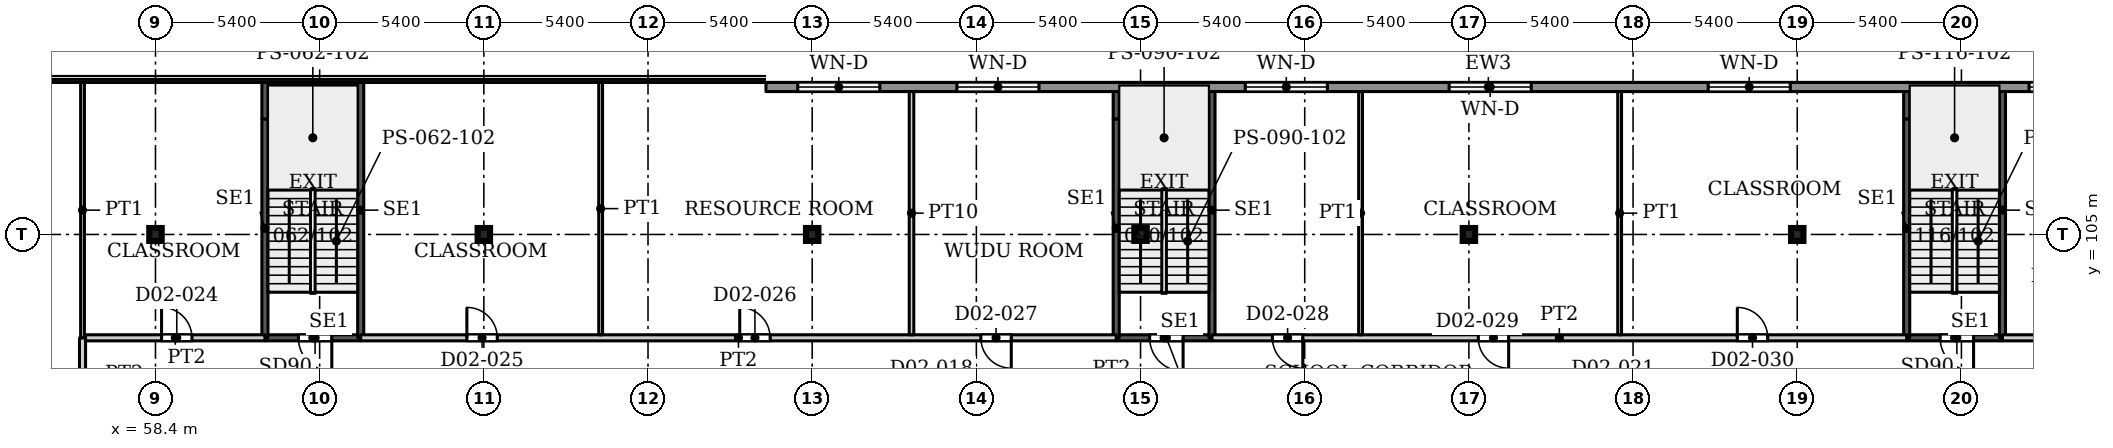
"""IFC4 building model, lengths in metres.
Left out: names, types, materials, properties, quantities, classifications, styles, units other than length and angle.
Written with IfcOpenShell. Run it as: python <this file> out.ifc"""

import sys

from ifc_helpers import new_model, si_unit, direction, frame, frame_2d, origin, origin_2d, place, context, subcontext, project, spatial, rectangle, i_section, extrude, source, transform, mapped, element, fill, save


model = new_model("IFC4")
c1 = context("Model", 3, precision=1e-05, world=origin(), true_north=direction((0.0, 1.0)))
c2 = subcontext(c1, "Body", "Model", "MODEL_VIEW")
j1 = project(units=[si_unit("LENGTHUNIT", "METRE"), si_unit("PLANEANGLEUNIT", "RADIAN")], contexts=[c1])
p1 = place(None, origin())
s1 = spatial("IfcSite", under=j1, at=p1, CompositionType="ELEMENT")
p2 = place(p1, origin())
s2 = spatial("IfcBuilding", under=s1, at=p2, CompositionType="ELEMENT")
p3 = place(p2, frame((0.0, 0.0, 12.5)))
s3 = spatial("IfcBuildingStorey", under=s2, at=p3, CompositionType="ELEMENT", Elevation=12.5)
for number, where, z_axis, x_axis in (
    (1, (58.4, 105.0, 0.0), (0.0, 0.0, 1.0), (1.0, 0.0, 0.0)),
    (2, (69.2, 105.0, 0.0), (0.0, 0.0, 1.0), (1.0, 0.0, 0.0)),
    (3, (80.0, 105.0, 0.0), (0.0, 0.0, 1.0), (1.0, 0.0, 0.0)),
    (4, (90.8, 105.0, 0.0), (0.0, 0.0, 1.0), (1.0, 0.0, 0.0)),
    (5, (101.6, 105.0, 0.0), (0.0, 0.0, 1.0), (1.0, 0.0, 0.0)),
    (6, (112.4, 105.0, 0.0), (0.0, 0.0, 1.0), (1.0, 0.0, 0.0)),
):
    element("IfcColumn", number, at=place(p3, frame(where, z_axis=z_axis, x_axis=x_axis)), inside=s3, PredefinedType="COLUMN", context=c2, shape_type="SweptSolid", body=[
        extrude(i_section(OverallWidth=0.409, OverallDepth=0.425, WebThickness=0.033, FlangeThickness=0.052, FilletRadius=0.013, at=origin_2d()), origin(), (0.0, 0.0, 1.0), 4.5),
    ])
p4 = place(p3, frame((78.48, 109.85, 0.0), z_axis=(0.0, 0.0, 1.0), x_axis=(1.0, 0.0, 0.0)))
e7 = element("IfcWall", 7, at=p4, inside=s3, PredefinedType="SOLIDWALL", context=c2, shape_type="SweptSolid", body=[
    extrude(rectangle(XDim=47.52, YDim=0.3, at=frame_2d((23.76, 0.0))), origin(), (0.0, 0.0, 1.0), 4.25),
])
p5 = place(p4, frame((1.045, 0.0, 0.9)))
e8 = element("IfcOpeningElement", 8, at=p5, cuts=e7, PredefinedType="OPENING", context=c2, shape_type="SweptSolid", body=[
    extrude(rectangle(XDim=2.7, YDim=2.1, at=frame_2d((1.35, 1.05))), frame((0.0, 0.16, 0.0), z_axis=(0.0, -1.0, 0.0), x_axis=(1.0, 0.0, 0.0)), (0.0, 0.0, 1.0), 0.32),
])
p6 = place(p4, frame((6.28, 0.0, 0.9)))
e9 = element("IfcOpeningElement", 9, at=p6, cuts=e7, PredefinedType="OPENING", context=c2, shape_type="SweptSolid", body=[
    extrude(rectangle(XDim=2.7, YDim=2.1, at=frame_2d((1.35, 1.05))), frame((0.0, 0.16, 0.0), z_axis=(0.0, -1.0, 0.0), x_axis=(1.0, 0.0, 0.0)), (0.0, 0.0, 1.0), 0.32),
])
p7 = place(p4, frame((15.765, 0.0, 0.9)))
e10 = element("IfcOpeningElement", 10, at=p7, cuts=e7, PredefinedType="OPENING", context=c2, shape_type="SweptSolid", body=[
    extrude(rectangle(XDim=2.7, YDim=2.1, at=frame_2d((1.35, 1.05))), frame((0.0, 0.16, 0.0), z_axis=(0.0, -1.0, 0.0), x_axis=(1.0, 0.0, 0.0)), (0.0, 0.0, 1.0), 0.32),
])
p8 = place(p4, frame((22.47, 0.0, 0.9)))
e11 = element("IfcOpeningElement", 11, at=p8, cuts=e7, PredefinedType="OPENING", context=c2, shape_type="SweptSolid", body=[
    extrude(rectangle(XDim=2.7, YDim=2.1, at=frame_2d((1.35, 1.05))), frame((0.0, 0.16, 0.0), z_axis=(0.0, -1.0, 0.0), x_axis=(1.0, 0.0, 0.0)), (0.0, 0.0, 1.0), 0.32),
])
p9 = place(p4, frame((30.99, 0.0, 0.9)))
e12 = element("IfcOpeningElement", 12, at=p9, cuts=e7, PredefinedType="OPENING", context=c2, shape_type="SweptSolid", body=[
    extrude(rectangle(XDim=2.7, YDim=2.1, at=frame_2d((1.35, 1.05))), frame((0.0, 0.16, 0.0), z_axis=(0.0, -1.0, 0.0), x_axis=(1.0, 0.0, 0.0)), (0.0, 0.0, 1.0), 0.32),
])
p10 = place(p4, frame((41.545, 0.0, 0.9)))
e13 = element("IfcOpeningElement", 13, at=p10, cuts=e7, PredefinedType="OPENING", context=c2, shape_type="SweptSolid", body=[
    extrude(rectangle(XDim=2.7, YDim=2.1, at=frame_2d((1.35, 1.05))), frame((0.0, 0.16, 0.0), z_axis=(0.0, -1.0, 0.0), x_axis=(1.0, 0.0, 0.0)), (0.0, 0.0, 1.0), 0.32),
])
p11 = place(p3, frame((62.0, 101.6, 0.0), z_axis=(0.0, 0.0, 1.0), x_axis=(1.0, 0.0, 0.0)))
e14 = element("IfcWall", 14, at=p11, inside=s3, PredefinedType="SHEAR", context=c2, shape_type="SweptSolid", body=[
    extrude(rectangle(XDim=3.15, YDim=0.2, at=frame_2d((1.575, 0.0))), origin(), (0.0, 0.0, 1.0), 4.5),
])
p12 = place(p11, frame((1.1, 0.0, 0.0)))
e15 = element("IfcOpeningElement", 15, at=p12, cuts=e14, PredefinedType="OPENING", context=c2, shape_type="SweptSolid", body=[
    extrude(rectangle(XDim=1.1, YDim=2.2, at=frame_2d((0.55, 1.1))), frame((0.0, 0.11, 0.0), z_axis=(0.0, -1.0, 0.0), x_axis=(1.0, 0.0, 0.0)), (0.0, 0.0, 1.0), 0.22),
])
p13 = place(p3, frame((62.0, 101.6, 0.0), z_axis=(0.0, 0.0, 1.0), x_axis=(0.0, 1.0, 0.0)))
e16 = element("IfcWall", 16, at=p13, inside=s3, PredefinedType="SHEAR", context=c2, shape_type="SweptSolid", body=[
    extrude(rectangle(XDim=7.2, YDim=0.2, at=frame_2d((3.6, 0.0))), origin(), (0.0, 0.0, 1.0), 4.5),
])
p14 = place(p3, frame((62.0, 108.8, 0.0), z_axis=(0.0, 0.0, 1.0), x_axis=(0.0, 1.0, 0.0)))
e17 = element("IfcWall", 17, at=p14, inside=s3, PredefinedType="SHEAR", context=c2, shape_type="SweptSolid", body=[
    extrude(rectangle(XDim=1.2, YDim=0.2, at=frame_2d((0.6, 0.0))), origin(), (0.0, 0.0, 1.0), 4.5),
])
p15 = place(p3, frame((65.15, 101.6, 0.0), z_axis=(0.0, 0.0, 1.0), x_axis=(0.0, 1.0, 0.0)))
e18 = element("IfcWall", 18, at=p15, inside=s3, PredefinedType="SHEAR", context=c2, shape_type="SweptSolid", body=[
    extrude(rectangle(XDim=8.4, YDim=0.2, at=frame_2d((4.2, 0.0))), origin(), (0.0, 0.0, 1.0), 4.5),
])
p16 = place(p3, frame((90.0, 101.6, 0.0), z_axis=(0.0, 0.0, 1.0), x_axis=(1.0, 0.0, 0.0)))
e19 = element("IfcWall", 19, at=p16, inside=s3, PredefinedType="SHEAR", context=c2, shape_type="SweptSolid", body=[
    extrude(rectangle(XDim=3.15, YDim=0.2, at=frame_2d((1.575, 0.0))), origin(), (0.0, 0.0, 1.0), 4.5),
])
p17 = place(p16, frame((1.1, 0.0, 0.0)))
e20 = element("IfcOpeningElement", 20, at=p17, cuts=e19, PredefinedType="OPENING", context=c2, shape_type="SweptSolid", body=[
    extrude(rectangle(XDim=1.1, YDim=2.2, at=frame_2d((0.55, 1.1))), frame((0.0, 0.11, 0.0), z_axis=(0.0, -1.0, 0.0), x_axis=(1.0, 0.0, 0.0)), (0.0, 0.0, 1.0), 0.22),
])
p18 = place(p3, frame((90.0, 101.6, 0.0), z_axis=(0.0, 0.0, 1.0), x_axis=(0.0, 1.0, 0.0)))
e21 = element("IfcWall", 21, at=p18, inside=s3, PredefinedType="SHEAR", context=c2, shape_type="SweptSolid", body=[
    extrude(rectangle(XDim=7.2, YDim=0.2, at=frame_2d((3.6, 0.0))), origin(), (0.0, 0.0, 1.0), 4.5),
])
p19 = place(p3, frame((90.0, 108.8, 0.0), z_axis=(0.0, 0.0, 1.0), x_axis=(0.0, 1.0, 0.0)))
e22 = element("IfcWall", 22, at=p19, inside=s3, PredefinedType="SHEAR", context=c2, shape_type="SweptSolid", body=[
    extrude(rectangle(XDim=1.2, YDim=0.2, at=frame_2d((0.6, 0.0))), origin(), (0.0, 0.0, 1.0), 4.5),
])
p20 = place(p3, frame((93.15, 101.6, 0.0), z_axis=(0.0, 0.0, 1.0), x_axis=(0.0, 1.0, 0.0)))
e23 = element("IfcWall", 23, at=p20, inside=s3, PredefinedType="SHEAR", context=c2, shape_type="SweptSolid", body=[
    extrude(rectangle(XDim=8.4, YDim=0.2, at=frame_2d((4.2, 0.0))), origin(), (0.0, 0.0, 1.0), 4.5),
])
p21 = place(p3, frame((116.0, 101.6, 0.0), z_axis=(0.0, 0.0, 1.0), x_axis=(1.0, 0.0, 0.0)))
e24 = element("IfcWall", 24, at=p21, inside=s3, PredefinedType="SHEAR", context=c2, shape_type="SweptSolid", body=[
    extrude(rectangle(XDim=3.15, YDim=0.2, at=frame_2d((1.575, 0.0))), origin(), (0.0, 0.0, 1.0), 4.5),
])
p22 = place(p21, frame((1.1, 0.0, 0.0)))
e25 = element("IfcOpeningElement", 25, at=p22, cuts=e24, PredefinedType="OPENING", context=c2, shape_type="SweptSolid", body=[
    extrude(rectangle(XDim=1.1, YDim=2.2, at=frame_2d((0.55, 1.1))), frame((0.0, 0.11, 0.0), z_axis=(0.0, -1.0, 0.0), x_axis=(1.0, 0.0, 0.0)), (0.0, 0.0, 1.0), 0.22),
])
p23 = place(p3, frame((116.0, 101.6, 0.0), z_axis=(0.0, 0.0, 1.0), x_axis=(0.0, 1.0, 0.0)))
e26 = element("IfcWall", 26, at=p23, inside=s3, PredefinedType="SHEAR", context=c2, shape_type="SweptSolid", body=[
    extrude(rectangle(XDim=7.2, YDim=0.2, at=frame_2d((3.6, 0.0))), origin(), (0.0, 0.0, 1.0), 4.5),
])
p24 = place(p3, frame((116.0, 108.8, 0.0), z_axis=(0.0, 0.0, 1.0), x_axis=(0.0, 1.0, 0.0)))
e27 = element("IfcWall", 27, at=p24, inside=s3, PredefinedType="SHEAR", context=c2, shape_type="SweptSolid", body=[
    extrude(rectangle(XDim=1.2, YDim=0.2, at=frame_2d((0.6, 0.0))), origin(), (0.0, 0.0, 1.0), 4.5),
])
p25 = place(p3, frame((119.15, 101.6, 0.0), z_axis=(0.0, 0.0, 1.0), x_axis=(0.0, 1.0, 0.0)))
e28 = element("IfcWall", 28, at=p25, inside=s3, PredefinedType="SHEAR", context=c2, shape_type="SweptSolid", body=[
    extrude(rectangle(XDim=8.4, YDim=0.2, at=frame_2d((4.2, 0.0))), origin(), (0.0, 0.0, 1.0), 4.5),
])
p26 = place(p3, frame((56.0, 99.2, 0.0), z_axis=(0.0, 0.0, 1.0), x_axis=(0.0, 1.0, 0.0)))
e29 = element("IfcWall", 29, at=p26, inside=s3, PredefinedType="PARTITIONING", context=c2, shape_type="SweptSolid", body=[
    extrude(rectangle(XDim=2.4, YDim=0.2, at=frame_2d((1.2, 0.0))), origin(), (0.0, 0.0, 1.0), 4.18),
])
p27 = place(p3, frame((56.0, 101.6, 0.0), z_axis=(0.0, 0.0, 1.0), x_axis=(0.0, 1.0, 0.0)))
e30 = element("IfcWall", 30, at=p27, inside=s3, PredefinedType="PARTITIONING", context=c2, shape_type="SweptSolid", body=[
    extrude(rectangle(XDim=8.4, YDim=0.125, at=frame_2d((4.2, 0.0))), origin(), (0.0, 0.0, 1.0), 4.18),
])
p28 = place(p3, frame((56.1, 101.6, 0.0), z_axis=(0.0, 0.0, 1.0), x_axis=(1.0, 0.0, 0.0)))
e31 = element("IfcWall", 31, at=p28, inside=s3, PredefinedType="PARTITIONING", context=c2, shape_type="SweptSolid", body=[
    extrude(rectangle(XDim=5.9, YDim=0.2, at=frame_2d((2.95, 0.0))), origin(), (0.0, 0.0, 1.0), 4.18),
])
p29 = place(p28, frame((2.5, 0.0, 0.0)))
e32 = element("IfcOpeningElement", 32, at=p29, cuts=e31, PredefinedType="OPENING", context=c2, shape_type="SweptSolid", body=[
    extrude(rectangle(XDim=1.0, YDim=2.1, at=frame_2d((0.5, 1.05))), frame((0.0, 0.11, 0.0), z_axis=(0.0, -1.0, 0.0), x_axis=(1.0, 0.0, 0.0)), (0.0, 0.0, 1.0), 0.22),
])
p30 = place(p3, frame((65.15, 101.6, 0.0), z_axis=(0.0, 0.0, 1.0), x_axis=(1.0, 0.0, 0.0)))
e33 = element("IfcWall", 33, at=p30, inside=s3, PredefinedType="PARTITIONING", context=c2, shape_type="SweptSolid", body=[
    extrude(rectangle(XDim=24.85, YDim=0.2, at=frame_2d((12.425, 0.0))), origin(), (0.0, 0.0, 1.0), 4.18),
])
p31 = place(p30, frame((3.492, 0.0, 0.0)))
e34 = element("IfcOpeningElement", 34, at=p31, cuts=e33, PredefinedType="OPENING", context=c2, shape_type="SweptSolid", body=[
    extrude(rectangle(XDim=1.0, YDim=2.1, at=frame_2d((0.5, 1.05))), frame((0.0, 0.11, 0.0), z_axis=(0.0, -1.0, 0.0), x_axis=(1.0, 0.0, 0.0)), (0.0, 0.0, 1.0), 0.22),
])
p32 = place(p30, frame((12.467, 0.0, 0.0)))
e35 = element("IfcOpeningElement", 35, at=p32, cuts=e33, PredefinedType="OPENING", context=c2, shape_type="SweptSolid", body=[
    extrude(rectangle(XDim=1.0, YDim=2.1, at=frame_2d((0.5, 1.05))), frame((0.0, 0.11, 0.0), z_axis=(0.0, -1.0, 0.0), x_axis=(1.0, 0.0, 0.0)), (0.0, 0.0, 1.0), 0.22),
])
p33 = place(p30, frame((20.398, 0.0, 0.0)))
e36 = element("IfcOpeningElement", 36, at=p33, cuts=e33, PredefinedType="OPENING", context=c2, shape_type="SweptSolid", body=[
    extrude(rectangle(XDim=1.0, YDim=2.1, at=frame_2d((0.5, 1.05))), frame((0.0, 0.11, 0.0), z_axis=(0.0, -1.0, 0.0), x_axis=(1.0, 0.0, 0.0)), (0.0, 0.0, 1.0), 0.22),
])
p34 = place(p3, frame((73.042, 101.7, 0.0), z_axis=(0.0, 0.0, 1.0), x_axis=(0.0, 1.0, 0.0)))
e37 = element("IfcWall", 37, at=p34, inside=s3, PredefinedType="PARTITIONING", context=c2, shape_type="SweptSolid", body=[
    extrude(rectangle(XDim=8.3, YDim=0.125, at=frame_2d((4.15, 0.0))), origin(), (0.0, 0.0, 1.0), 4.18),
])
p35 = place(p3, frame((83.267, 101.7, 0.0), z_axis=(0.0, 0.0, 1.0), x_axis=(0.0, 1.0, 0.0)))
e38 = element("IfcWall", 38, at=p35, inside=s3, PredefinedType="PARTITIONING", context=c2, shape_type="SweptSolid", body=[
    extrude(rectangle(XDim=8.001, YDim=0.15, at=frame_2d((4.0, 0.0))), origin(), (0.0, 0.0, 1.0), 4.18),
])
p36 = place(p3, frame((93.15, 101.6, 0.0), z_axis=(0.0, 0.0, 1.0), x_axis=(1.0, 0.0, 0.0)))
e39 = element("IfcWall", 39, at=p36, inside=s3, PredefinedType="PARTITIONING", context=c2, shape_type="SweptSolid", body=[
    extrude(rectangle(XDim=22.85, YDim=0.2, at=frame_2d((11.425, 0.0))), origin(), (0.0, 0.0, 1.0), 4.18),
])
p37 = place(p36, frame((1.987, 0.0, 0.0)))
e40 = element("IfcOpeningElement", 40, at=p37, cuts=e39, PredefinedType="OPENING", context=c2, shape_type="SweptSolid", body=[
    extrude(rectangle(XDim=1.0, YDim=2.1, at=frame_2d((0.5, 1.05))), frame((0.0, 0.11, 0.0), z_axis=(0.0, -1.0, 0.0), x_axis=(1.0, 0.0, 0.0)), (0.0, 0.0, 1.0), 0.22),
])
p38 = place(p36, frame((8.758, 0.0, 0.0)))
e41 = element("IfcOpeningElement", 41, at=p38, cuts=e39, PredefinedType="OPENING", context=c2, shape_type="SweptSolid", body=[
    extrude(rectangle(XDim=1.0, YDim=2.1, at=frame_2d((0.5, 1.05))), frame((0.0, 0.11, 0.0), z_axis=(0.0, -1.0, 0.0), x_axis=(1.0, 0.0, 0.0)), (0.0, 0.0, 1.0), 0.22),
])
p39 = place(p36, frame((17.279, 0.0, 0.0)))
e42 = element("IfcOpeningElement", 42, at=p39, cuts=e39, PredefinedType="OPENING", context=c2, shape_type="SweptSolid", body=[
    extrude(rectangle(XDim=1.0, YDim=2.1, at=frame_2d((0.5, 1.05))), frame((0.0, 0.11, 0.0), z_axis=(0.0, -1.0, 0.0), x_axis=(1.0, 0.0, 0.0)), (0.0, 0.0, 1.0), 0.22),
])
for number, where, z_axis, x_axis in (
    (43, (98.037, 101.7, 0.0), (0.0, 0.0, 1.0), (0.0, 1.0, 0.0)),
    (44, (106.558, 101.7, 0.0), (0.0, 0.0, 1.0), (0.0, 1.0, 0.0)),
):
    element("IfcWall", number, at=place(p3, frame(where, z_axis=z_axis, x_axis=x_axis)), inside=s3, PredefinedType="PARTITIONING", context=c2, shape_type="SweptSolid", body=[
        extrude(rectangle(XDim=8.001, YDim=0.125, at=frame_2d((4.0, 0.0))), origin(), (0.0, 0.0, 1.0), 4.18),
    ])
p40 = place(p3, frame((119.15, 101.6, 0.0), z_axis=(0.0, 0.0, 1.0), x_axis=(1.0, 0.0, 0.0)))
e45 = element("IfcWall", 45, at=p40, inside=s3, PredefinedType="PARTITIONING", context=c2, shape_type="SweptSolid", body=[
    extrude(rectangle(XDim=4.35, YDim=0.2, at=frame_2d((2.175, 0.0))), origin(), (0.0, 0.0, 1.0), 4.18),
])
p41 = place(p40, frame((1.8, 0.0, 0.0)))
e46 = element("IfcOpeningElement", 46, at=p41, cuts=e45, PredefinedType="OPENING", context=c2, shape_type="SweptSolid", body=[
    extrude(rectangle(XDim=1.0, YDim=2.1, at=frame_2d((0.5, 1.05))), frame((0.0, 0.11, 0.0), z_axis=(0.0, -1.0, 0.0), x_axis=(1.0, 0.0, 0.0)), (0.0, 0.0, 1.0), 0.22),
])
m1 = source(origin(), c2, "Body", "SweptSolid", [
    extrude(rectangle(XDim=2.7, YDim=2.1, at=frame_2d((1.35, 1.05))), frame((0.0, 0.03, 0.0), z_axis=(0.0, -1.0, 0.0), x_axis=(1.0, 0.0, 0.0)), (0.0, 0.0, 1.0), 0.06),
])
p42 = place(p5, origin())
e47 = element("IfcWindow", 47, at=p42, inside=s3, PartitioningType="SINGLE_PANEL", PredefinedType="WINDOW", context=c2, shape_type="MappedRepresentation", body=[
    mapped(m1, transform((0.0, 0.0, 0.0), x_axis=(1.0, 0.0, 0.0), y_axis=(0.0, 1.0, 0.0), z_axis=(0.0, 0.0, 1.0), scale=1.0)),
])
fill(e8, e47)
p43 = place(p6, origin())
e48 = element("IfcWindow", 48, at=p43, inside=s3, PartitioningType="SINGLE_PANEL", PredefinedType="WINDOW", context=c2, shape_type="MappedRepresentation", body=[
    mapped(m1, transform((0.0, 0.0, 0.0), x_axis=(1.0, 0.0, 0.0), y_axis=(0.0, 1.0, 0.0), z_axis=(0.0, 0.0, 1.0), scale=1.0)),
])
fill(e9, e48)
p44 = place(p7, origin())
e49 = element("IfcWindow", 49, at=p44, inside=s3, PartitioningType="SINGLE_PANEL", PredefinedType="WINDOW", context=c2, shape_type="MappedRepresentation", body=[
    mapped(m1, transform((0.0, 0.0, 0.0), x_axis=(1.0, 0.0, 0.0), y_axis=(0.0, 1.0, 0.0), z_axis=(0.0, 0.0, 1.0), scale=1.0)),
])
fill(e10, e49)
p45 = place(p8, origin())
e50 = element("IfcWindow", 50, at=p45, inside=s3, PartitioningType="SINGLE_PANEL", PredefinedType="WINDOW", context=c2, shape_type="MappedRepresentation", body=[
    mapped(m1, transform((0.0, 0.0, 0.0), x_axis=(1.0, 0.0, 0.0), y_axis=(0.0, 1.0, 0.0), z_axis=(0.0, 0.0, 1.0), scale=1.0)),
])
fill(e11, e50)
p46 = place(p9, origin())
e51 = element("IfcWindow", 51, at=p46, inside=s3, PartitioningType="SINGLE_PANEL", PredefinedType="WINDOW", context=c2, shape_type="MappedRepresentation", body=[
    mapped(m1, transform((0.0, 0.0, 0.0), x_axis=(1.0, 0.0, 0.0), y_axis=(0.0, 1.0, 0.0), z_axis=(0.0, 0.0, 1.0), scale=1.0)),
])
fill(e12, e51)
p47 = place(p10, origin())
e52 = element("IfcWindow", 52, at=p47, inside=s3, PartitioningType="SINGLE_PANEL", PredefinedType="WINDOW", context=c2, shape_type="MappedRepresentation", body=[
    mapped(m1, transform((0.0, 0.0, 0.0), x_axis=(1.0, 0.0, 0.0), y_axis=(0.0, 1.0, 0.0), z_axis=(0.0, 0.0, 1.0), scale=1.0)),
])
fill(e13, e52)
m2 = source(origin(), c2, "Body", "SweptSolid", [
    extrude(rectangle(XDim=1.1, YDim=2.2, at=frame_2d((0.55, 1.1))), frame((0.0, 0.025, 0.0), z_axis=(0.0, -1.0, 0.0), x_axis=(1.0, 0.0, 0.0)), (0.0, 0.0, 1.0), 0.05),
])
p48 = place(p12, origin())
e53 = element("IfcDoor", 53, at=p48, inside=s3, OperationType="SINGLE_SWING_RIGHT", PredefinedType="DOOR", context=c2, shape_type="MappedRepresentation", body=[
    mapped(m2, transform((0.0, 0.0, 0.0), x_axis=(1.0, 0.0, 0.0), y_axis=(0.0, 1.0, 0.0), z_axis=(0.0, 0.0, 1.0), scale=1.0)),
])
fill(e15, e53)
p49 = place(p17, origin())
e54 = element("IfcDoor", 54, at=p49, inside=s3, OperationType="SINGLE_SWING_RIGHT", PredefinedType="DOOR", context=c2, shape_type="MappedRepresentation", body=[
    mapped(m2, transform((0.0, 0.0, 0.0), x_axis=(1.0, 0.0, 0.0), y_axis=(0.0, 1.0, 0.0), z_axis=(0.0, 0.0, 1.0), scale=1.0)),
])
fill(e20, e54)
p50 = place(p22, origin())
e55 = element("IfcDoor", 55, at=p50, inside=s3, OperationType="SINGLE_SWING_RIGHT", PredefinedType="DOOR", context=c2, shape_type="MappedRepresentation", body=[
    mapped(m2, transform((0.0, 0.0, 0.0), x_axis=(1.0, 0.0, 0.0), y_axis=(0.0, 1.0, 0.0), z_axis=(0.0, 0.0, 1.0), scale=1.0)),
])
fill(e25, e55)
m3 = source(origin(), c2, "Body", "SweptSolid", [
    extrude(rectangle(XDim=1.0, YDim=2.1, at=frame_2d((0.5, 1.05))), frame((0.0, 0.025, 0.0), z_axis=(0.0, -1.0, 0.0), x_axis=(1.0, 0.0, 0.0)), (0.0, 0.0, 1.0), 0.05),
])
p51 = place(p29, origin())
e56 = element("IfcDoor", 56, at=p51, inside=s3, OperationType="SINGLE_SWING_LEFT", PredefinedType="DOOR", context=c2, shape_type="MappedRepresentation", body=[
    mapped(m3, transform((0.0, 0.0, 0.0), x_axis=(1.0, 0.0, 0.0), y_axis=(0.0, 1.0, 0.0), z_axis=(0.0, 0.0, 1.0), scale=1.0)),
])
fill(e32, e56)
p52 = place(p31, origin())
e57 = element("IfcDoor", 57, at=p52, inside=s3, OperationType="SINGLE_SWING_LEFT", PredefinedType="DOOR", context=c2, shape_type="MappedRepresentation", body=[
    mapped(m3, transform((0.0, 0.0, 0.0), x_axis=(1.0, 0.0, 0.0), y_axis=(0.0, 1.0, 0.0), z_axis=(0.0, 0.0, 1.0), scale=1.0)),
])
fill(e34, e57)
p53 = place(p32, origin())
e58 = element("IfcDoor", 58, at=p53, inside=s3, OperationType="SINGLE_SWING_LEFT", PredefinedType="DOOR", context=c2, shape_type="MappedRepresentation", body=[
    mapped(m3, transform((0.0, 0.0, 0.0), x_axis=(1.0, 0.0, 0.0), y_axis=(0.0, 1.0, 0.0), z_axis=(0.0, 0.0, 1.0), scale=1.0)),
])
fill(e35, e58)
p54 = place(p33, origin())
e59 = element("IfcDoor", 59, at=p54, inside=s3, OperationType="SINGLE_SWING_RIGHT", PredefinedType="DOOR", context=c2, shape_type="MappedRepresentation", body=[
    mapped(m3, transform((0.0, 0.0, 0.0), x_axis=(1.0, 0.0, 0.0), y_axis=(0.0, 1.0, 0.0), z_axis=(0.0, 0.0, 1.0), scale=1.0)),
])
fill(e36, e59)
p55 = place(p37, origin())
e60 = element("IfcDoor", 60, at=p55, inside=s3, OperationType="SINGLE_SWING_RIGHT", PredefinedType="DOOR", context=c2, shape_type="MappedRepresentation", body=[
    mapped(m3, transform((0.0, 0.0, 0.0), x_axis=(1.0, 0.0, 0.0), y_axis=(0.0, 1.0, 0.0), z_axis=(0.0, 0.0, 1.0), scale=1.0)),
])
fill(e40, e60)
p56 = place(p38, origin())
e61 = element("IfcDoor", 61, at=p56, inside=s3, OperationType="SINGLE_SWING_RIGHT", PredefinedType="DOOR", context=c2, shape_type="MappedRepresentation", body=[
    mapped(m3, transform((0.0, 0.0, 0.0), x_axis=(1.0, 0.0, 0.0), y_axis=(0.0, 1.0, 0.0), z_axis=(0.0, 0.0, 1.0), scale=1.0)),
])
fill(e41, e61)
p57 = place(p39, origin())
e62 = element("IfcDoor", 62, at=p57, inside=s3, OperationType="SINGLE_SWING_LEFT", PredefinedType="DOOR", context=c2, shape_type="MappedRepresentation", body=[
    mapped(m3, transform((0.0, 0.0, 0.0), x_axis=(1.0, 0.0, 0.0), y_axis=(0.0, 1.0, 0.0), z_axis=(0.0, 0.0, 1.0), scale=1.0)),
])
fill(e42, e62)
save(model, sys.argv[1])
